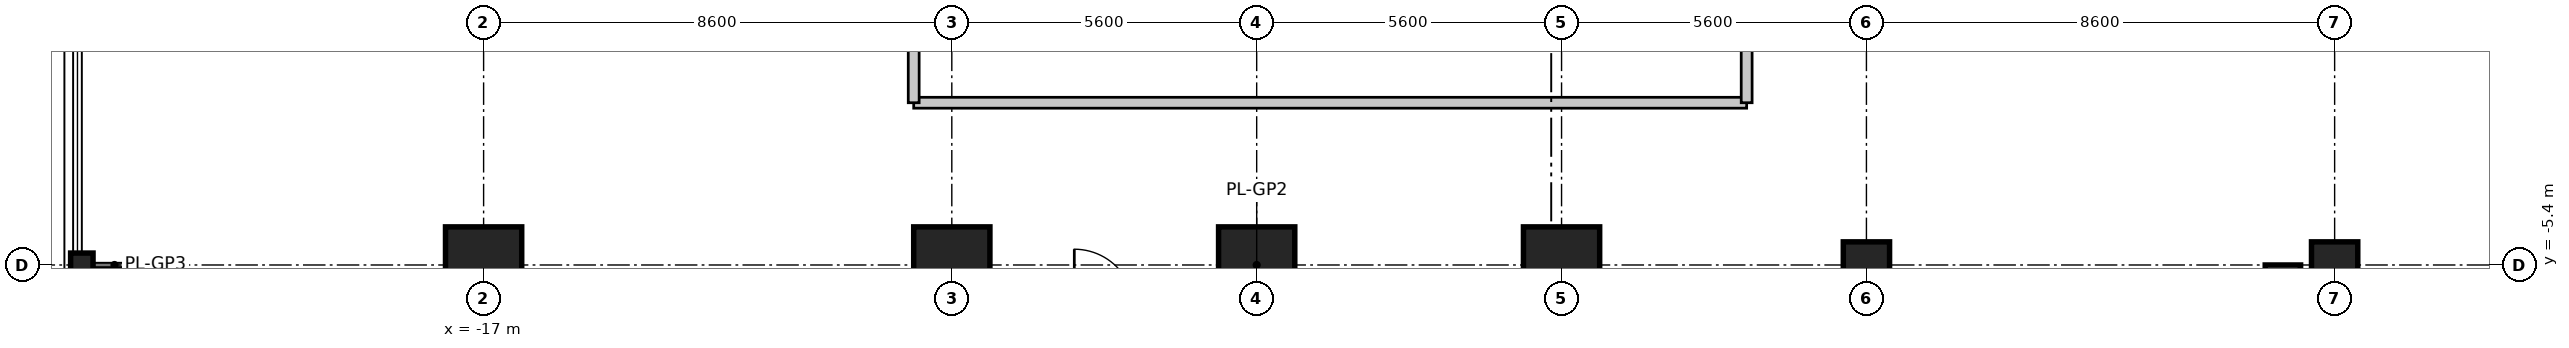
"""IFC4 building model, lengths in metres.
Left out: names, types, materials, properties, quantities, classifications, styles, units other than length and angle.
Written with IfcOpenShell. Run it as: python <this file> out.ifc"""

import sys

from ifc_helpers import new_model, si_unit, direction, frame, frame_2d, origin, origin_2d, place, context, subcontext, project, spatial, rectangle, i_section, extrude, source, transform, mapped, element, save


model = new_model("IFC4")
c1 = context("Model", 3, precision=1e-05, world=origin(), true_north=direction((0.0, 1.0)))
c2 = subcontext(c1, "Body", "Model", "MODEL_VIEW")
j1 = project(units=[si_unit("LENGTHUNIT", "METRE"), si_unit("PLANEANGLEUNIT", "RADIAN")], contexts=[c1])
p1 = place(None, origin())
s1 = spatial("IfcSite", under=j1, at=p1, CompositionType="ELEMENT")
p2 = place(p1, origin())
s2 = spatial("IfcBuilding", under=s1, at=p2, CompositionType="ELEMENT")
p3 = place(p2, frame((0.0, 0.0, 83.5)))
s3 = spatial("IfcBuildingStorey", under=s2, at=p3, CompositionType="ELEMENT", Elevation=83.5)
m1 = source(origin(), c2, "Body", "SweptSolid", [
    extrude(rectangle(XDim=1.4, YDim=1.4, at=origin_2d()), origin(), (0.0, 0.0, 1.0), 4.755),
])
for number, where, z_axis, x_axis in (
    (1, (-17.0, -5.4, 0.0), (0.0, 0.0, 1.0), (1.0, 0.0, 0.0)),
    (2, (-8.4, -5.4, 0.0), (0.0, 0.0, 1.0), (1.0, 0.0, 0.0)),
    (3, (-2.8, -5.4, 0.0), (0.0, 0.0, 1.0), (1.0, 0.0, 0.0)),
    (4, (2.8, -5.4, 0.0), (0.0, 0.0, 1.0), (1.0, 0.0, 0.0)),
):
    element("IfcColumn", number, at=place(p3, frame(where, z_axis=z_axis, x_axis=x_axis)), inside=s3, PredefinedType="COLUMN", context=c2, shape_type="MappedRepresentation", body=[
        mapped(m1, transform((0.0, 0.0, 0.0), scale=1.0)),
    ])
m2 = source(origin(), c2, "Body", "SweptSolid", [
    extrude(rectangle(XDim=0.85, YDim=0.85, at=origin_2d()), origin(), (0.0, 0.0, 1.0), 4.755),
])
for number, where, z_axis, x_axis in (
    (5, (8.4, -5.4, 0.0), (0.0, 0.0, 1.0), (1.0, 0.0, 0.0)),
    (6, (17.0, -5.4, 0.0), (0.0, 0.0, 1.0), (1.0, 0.0, 0.0)),
):
    element("IfcColumn", number, at=place(p3, frame(where, z_axis=z_axis, x_axis=x_axis)), inside=s3, PredefinedType="PILASTER", context=c2, shape_type="MappedRepresentation", body=[
        mapped(m2, transform((0.0, 0.0, 0.0), scale=1.0)),
    ])
m3 = source(origin(), c2, "Body", "SweptSolid", [
    extrude(i_section(OverallWidth=0.412, OverallDepth=0.438, WebThickness=0.023, FlangeThickness=0.036, at=origin_2d()), origin(), (0.0, 0.0, 1.0), 4.694),
])
p4 = place(p3, frame((-24.38, -5.4, 0.0), z_axis=(0.127804637987, 0.0, 0.991799362023), x_axis=(0.0, 1.0, 0.0)))
e7 = element("IfcColumn", 7, at=p4, inside=s3, PredefinedType="COLUMN", context=c2, shape_type="MappedRepresentation", body=[
    mapped(m3, transform((0.0, 0.0, 0.0), scale=1.0)),
])
m4 = source(origin(), c2, "Body", "SweptSolid", [
    extrude(rectangle(XDim=11.6, YDim=0.65, at=frame_2d((5.8, 0.0))), origin(), (0.0, 0.0, 1.0), 4.53),
])
p5 = place(p3, frame((16.05, -17.0, 0.0), z_axis=(0.0, 0.0, 1.0), x_axis=(0.0, 1.0, 0.0)))
e8 = element("IfcWall", 8, at=p5, inside=s3, PredefinedType="SHEAR", context=c2, shape_type="MappedRepresentation", body=[
    mapped(m4, transform((0.0, 0.0, 0.0), scale=1.0)),
])
m5 = source(origin(), c2, "Body", "SweptSolid", [
    extrude(rectangle(XDim=15.3, YDim=0.2, at=frame_2d((7.65, 0.0))), origin(), (0.0, 0.0, 1.0), 3.4),
])
p6 = place(p3, frame((-9.1, -2.42, 0.0), z_axis=(0.0, 0.0, 1.0), x_axis=(1.0, 0.0, 0.0)))
e9 = element("IfcWall", 9, at=p6, inside=s3, PredefinedType="PARTITIONING", context=c2, shape_type="MappedRepresentation", body=[
    mapped(m5, transform((0.0, 0.0, 0.0), scale=1.0)),
])
m6 = source(origin(), c2, "Body", "SweptSolid", [
    extrude(rectangle(XDim=4.84, YDim=0.2, at=frame_2d((2.42, 0.0))), origin(), (0.0, 0.0, 1.0), 3.4),
])
for number, where, z_axis, x_axis in (
    (10, (-9.1, -2.42, 0.0), (0.0, 0.0, 1.0), (0.0, 1.0, 0.0)),
    (11, (6.2, -2.42, 0.0), (0.0, 0.0, 1.0), (0.0, 1.0, 0.0)),
):
    element("IfcWall", number, at=place(p3, frame(where, z_axis=z_axis, x_axis=x_axis)), inside=s3, PredefinedType="PARTITIONING", context=c2, shape_type="MappedRepresentation", body=[
        mapped(m6, transform((0.0, 0.0, 0.0), scale=1.0)),
    ])
save(model, sys.argv[1])
